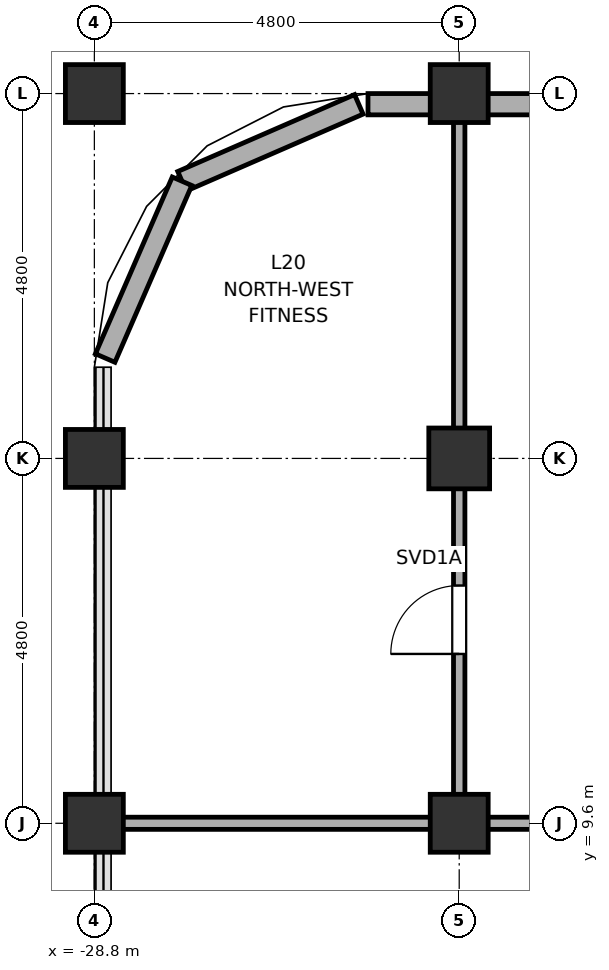
"""IFC4 building model, lengths in metres.
Left out: names, types, materials, properties, quantities, classifications, styles, units other than length and angle.
Written with IfcOpenShell. Run it as: python <this file> out.ifc"""

import sys

from ifc_helpers import new_model, si_unit, direction, frame, frame_2d, origin, origin_2d, place, context, subcontext, project, spatial, rectangle, hollow_rectangle, hollow_circle, extrude, element, fill, save


model = new_model("IFC4")
c1 = context("Model", 3, precision=1e-05, world=origin(), true_north=direction((0.0, 1.0)))
c2 = subcontext(c1, "Body", "Model", "MODEL_VIEW")
j1 = project(units=[si_unit("LENGTHUNIT", "METRE"), si_unit("PLANEANGLEUNIT", "RADIAN")], contexts=[c1])
p1 = place(None, origin())
s1 = spatial("IfcSite", under=j1, at=p1, CompositionType="ELEMENT")
p2 = place(p1, origin())
s2 = spatial("IfcBuilding", under=s1, at=p2, CompositionType="ELEMENT")
p3 = place(p2, frame((0.0, 0.0, 85.5)))
s3 = spatial("IfcBuildingStorey", under=s2, at=p3, CompositionType="ELEMENT", Elevation=85.5)
for number, where, z_axis, x_axis in (
    (1, (-28.8, 9.6, 0.0), (0.0, 0.0, 1.0), (1.0, 0.0, 0.0)),
    (2, (-28.8, 14.4, 0.0), (0.0, 0.0, 1.0), (1.0, 0.0, 0.0)),
    (3, (-28.8, 19.2, 0.0), (0.0, 0.0, 1.0), (1.0, 0.0, 0.0)),
    (4, (-24.0, 9.6, 0.0), (0.0, 0.0, 1.0), (1.0, 0.0, 0.0)),
):
    element("IfcColumn", number, at=place(p3, frame(where, z_axis=z_axis, x_axis=x_axis)), inside=s3, PredefinedType="COLUMN", context=c2, shape_type="SweptSolid", body=[
        extrude(hollow_circle(Radius=0.381, WallThickness=0.032, at=origin_2d()), origin(), (0.0, 0.0, 1.0), 3.7),
    ])
p4 = place(p3, frame((-24.0, 14.4, 0.0), z_axis=(0.0, 0.0, 1.0), x_axis=(1.0, 0.0, 0.0)))
e5 = element("IfcColumn", 5, at=p4, inside=s3, PredefinedType="COLUMN", context=c2, shape_type="SweptSolid", body=[
    extrude(hollow_rectangle(XDim=0.8, YDim=0.8, WallThickness=0.036, at=origin_2d()), origin(), (0.0, 0.0, 1.0), 3.7),
])
p5 = place(p3, frame((-24.0, 19.2, 0.0), z_axis=(0.0, 0.0, 1.0), x_axis=(1.0, 0.0, 0.0)))
e6 = element("IfcColumn", 6, at=p5, inside=s3, PredefinedType="COLUMN", context=c2, shape_type="SweptSolid", body=[
    extrude(hollow_circle(Radius=0.381, WallThickness=0.032, at=origin_2d()), origin(), (0.0, 0.0, 1.0), 3.7),
])
p6 = place(p3, frame((-25.321, 19.058, 0.0), z_axis=(0.0, 0.0, 1.0), x_axis=(-0.917060872934, -0.398747232384, 0.0)))
e7 = element("IfcWall", 7, at=p6, inside=s3, PredefinedType="SOLIDWALL", context=c2, shape_type="SweptSolid", body=[
    extrude(rectangle(XDim=2.536, YDim=0.28, at=frame_2d((1.268, 0.0))), origin(), (0.0, 0.0, 1.0), 2.05),
])
p7 = place(p3, frame((-27.646, 18.047, 0.0), z_axis=(0.0, 0.0, 1.0), x_axis=(-0.398792985289, -0.917040977756, 0.0)))
e8 = element("IfcWall", 8, at=p7, inside=s3, PredefinedType="SOLIDWALL", context=c2, shape_type="SweptSolid", body=[
    extrude(rectangle(XDim=2.536, YDim=0.28, at=frame_2d((1.268, 0.0))), origin(), (0.0, 0.0, 1.0), 2.75),
])
p8 = place(p3, frame((-25.2, 19.06, 0.0), z_axis=(0.0, 0.0, 1.0), x_axis=(1.0, 0.0, 0.0)))
e9 = element("IfcWall", 9, at=p8, inside=s3, PredefinedType="SOLIDWALL", context=c2, shape_type="SweptSolid", body=[
    extrude(rectangle(XDim=20.45, YDim=0.28, at=frame_2d((10.225, 0.0))), origin(), (0.0, 0.0, 1.0), 2.05),
])
p9 = place(p8, frame((9.0, 0.0, 0.75)))
e10 = element("IfcOpeningElement", 10, at=p9, cuts=e9, PredefinedType="OPENING", context=c2, shape_type="SweptSolid", body=[
    extrude(rectangle(XDim=1.2, YDim=1.15, at=frame_2d((0.6, 0.575))), frame((0.0, 0.155, 0.0), z_axis=(0.0, -1.0, 0.0), x_axis=(1.0, 0.0, 0.0)), (0.0, 0.0, 1.0), 0.31),
])
p10 = place(p8, frame((12.3, 0.0, 0.75)))
e11 = element("IfcOpeningElement", 11, at=p10, cuts=e9, PredefinedType="OPENING", context=c2, shape_type="SweptSolid", body=[
    extrude(rectangle(XDim=1.8, YDim=1.15, at=frame_2d((0.9, 0.575))), frame((0.0, 0.155, 0.0), z_axis=(0.0, -1.0, 0.0), x_axis=(1.0, 0.0, 0.0)), (0.0, 0.0, 1.0), 0.31),
])
p11 = place(p8, frame((17.1, 0.0, 0.75)))
e12 = element("IfcOpeningElement", 12, at=p11, cuts=e9, PredefinedType="OPENING", context=c2, shape_type="SweptSolid", body=[
    extrude(rectangle(XDim=1.8, YDim=1.15, at=frame_2d((0.9, 0.575))), frame((0.0, 0.155, 0.0), z_axis=(0.0, -1.0, 0.0), x_axis=(1.0, 0.0, 0.0)), (0.0, 0.0, 1.0), 0.31),
])
p12 = place(p3, frame((-28.63, 9.6, 0.0), z_axis=(0.0, 0.0, 1.0), x_axis=(1.0, 0.0, 0.0)))
e13 = element("IfcWall", 13, at=p12, inside=s3, PredefinedType="PARTITIONING", context=c2, shape_type="SweptSolid", body=[
    extrude(rectangle(XDim=62.06, YDim=0.16, at=frame_2d((31.03, 0.0))), origin(), (0.0, 0.0, 1.0), 2.05),
])
p13 = place(p12, frame((6.54, 0.0, 0.0)))
e14 = element("IfcOpeningElement", 14, at=p13, cuts=e13, PredefinedType="OPENING", context=c2, shape_type="SweptSolid", body=[
    extrude(rectangle(XDim=0.9, YDim=2.02, at=frame_2d((0.45, 1.01))), frame((0.0, 0.095, 0.0), z_axis=(0.0, -1.0, 0.0), x_axis=(1.0, 0.0, 0.0)), (0.0, 0.0, 1.0), 0.19),
])
p14 = place(p12, frame((54.62, 0.0, 0.0)))
e15 = element("IfcOpeningElement", 15, at=p14, cuts=e13, PredefinedType="OPENING", context=c2, shape_type="SweptSolid", body=[
    extrude(rectangle(XDim=0.9, YDim=2.02, at=frame_2d((0.45, 1.01))), frame((0.0, 0.095, 0.0), z_axis=(0.0, -1.0, 0.0), x_axis=(1.0, 0.0, 0.0)), (0.0, 0.0, 1.0), 0.19),
])
p15 = place(p12, frame((10.69, 0.0, 0.0)))
e16 = element("IfcOpeningElement", 16, at=p15, cuts=e13, PredefinedType="OPENING", context=c2, shape_type="SweptSolid", body=[
    extrude(rectangle(XDim=0.9, YDim=2.02, at=frame_2d((0.45, 1.01))), frame((0.0, 0.095, 0.0), z_axis=(0.0, -1.0, 0.0), x_axis=(1.0, 0.0, 0.0)), (0.0, 0.0, 1.0), 0.19),
])
p16 = place(p12, frame((12.58, 0.0, 0.0)))
e17 = element("IfcOpeningElement", 17, at=p16, cuts=e13, PredefinedType="OPENING", context=c2, shape_type="SweptSolid", body=[
    extrude(rectangle(XDim=0.9, YDim=2.02, at=frame_2d((0.45, 1.01))), frame((0.0, 0.095, 0.0), z_axis=(0.0, -1.0, 0.0), x_axis=(1.0, 0.0, 0.0)), (0.0, 0.0, 1.0), 0.19),
])
p17 = place(p12, frame((16.74, 0.0, 0.0)))
e18 = element("IfcOpeningElement", 18, at=p17, cuts=e13, PredefinedType="OPENING", context=c2, shape_type="SweptSolid", body=[
    extrude(rectangle(XDim=0.92, YDim=2.02, at=frame_2d((0.46, 1.01))), frame((0.0, 0.095, 0.0), z_axis=(0.0, -1.0, 0.0), x_axis=(1.0, 0.0, 0.0)), (0.0, 0.0, 1.0), 0.19),
])
p18 = place(p12, frame((20.4, 0.0, 0.0)))
e19 = element("IfcOpeningElement", 19, at=p18, cuts=e13, PredefinedType="OPENING", context=c2, shape_type="SweptSolid", body=[
    extrude(rectangle(XDim=0.92, YDim=2.02, at=frame_2d((0.46, 1.01))), frame((0.0, 0.095, 0.0), z_axis=(0.0, -1.0, 0.0), x_axis=(1.0, 0.0, 0.0)), (0.0, 0.0, 1.0), 0.19),
])
p19 = place(p12, frame((26.34, 0.0, 0.0)))
e20 = element("IfcOpeningElement", 20, at=p19, cuts=e13, PredefinedType="OPENING", context=c2, shape_type="SweptSolid", body=[
    extrude(rectangle(XDim=0.92, YDim=2.02, at=frame_2d((0.46, 1.01))), frame((0.0, 0.095, 0.0), z_axis=(0.0, -1.0, 0.0), x_axis=(1.0, 0.0, 0.0)), (0.0, 0.0, 1.0), 0.19),
])
p20 = place(p12, frame((30.0, 0.0, 0.0)))
e21 = element("IfcOpeningElement", 21, at=p20, cuts=e13, PredefinedType="OPENING", context=c2, shape_type="SweptSolid", body=[
    extrude(rectangle(XDim=0.92, YDim=2.02, at=frame_2d((0.46, 1.01))), frame((0.0, 0.095, 0.0), z_axis=(0.0, -1.0, 0.0), x_axis=(1.0, 0.0, 0.0)), (0.0, 0.0, 1.0), 0.19),
])
p21 = place(p12, frame((35.38, 0.0, 0.0)))
e22 = element("IfcOpeningElement", 22, at=p21, cuts=e13, PredefinedType="OPENING", context=c2, shape_type="SweptSolid", body=[
    extrude(rectangle(XDim=0.9, YDim=2.02, at=frame_2d((0.45, 1.01))), frame((0.0, 0.095, 0.0), z_axis=(0.0, -1.0, 0.0), x_axis=(1.0, 0.0, 0.0)), (0.0, 0.0, 1.0), 0.19),
])
p22 = place(p12, frame((40.18, 0.0, 0.0)))
e23 = element("IfcOpeningElement", 23, at=p22, cuts=e13, PredefinedType="OPENING", context=c2, shape_type="SweptSolid", body=[
    extrude(rectangle(XDim=0.9, YDim=2.02, at=frame_2d((0.45, 1.01))), frame((0.0, 0.095, 0.0), z_axis=(0.0, -1.0, 0.0), x_axis=(1.0, 0.0, 0.0)), (0.0, 0.0, 1.0), 0.19),
])
p23 = place(p12, frame((44.98, 0.0, 0.0)))
e24 = element("IfcOpeningElement", 24, at=p23, cuts=e13, PredefinedType="OPENING", context=c2, shape_type="SweptSolid", body=[
    extrude(rectangle(XDim=0.9, YDim=2.02, at=frame_2d((0.45, 1.01))), frame((0.0, 0.095, 0.0), z_axis=(0.0, -1.0, 0.0), x_axis=(1.0, 0.0, 0.0)), (0.0, 0.0, 1.0), 0.19),
])
p24 = place(p12, frame((50.34, 0.0, 0.0)))
e25 = element("IfcOpeningElement", 25, at=p24, cuts=e13, PredefinedType="OPENING", context=c2, shape_type="SweptSolid", body=[
    extrude(rectangle(XDim=0.92, YDim=2.02, at=frame_2d((0.46, 1.01))), frame((0.0, 0.095, 0.0), z_axis=(0.0, -1.0, 0.0), x_axis=(1.0, 0.0, 0.0)), (0.0, 0.0, 1.0), 0.19),
])
p25 = place(p3, frame((-24.0, 9.72, 0.0), z_axis=(0.0, 0.0, 1.0), x_axis=(0.0, 1.0, 0.0)))
e26 = element("IfcWall", 26, at=p25, inside=s3, PredefinedType="PARTITIONING", context=c2, shape_type="SweptSolid", body=[
    extrude(rectangle(XDim=9.19, YDim=0.15, at=frame_2d((4.595, 0.0))), origin(), (0.0, 0.0, 1.0), 2.05),
])
p26 = place(p25, frame((2.108, 0.0, 0.0)))
e27 = element("IfcOpeningElement", 27, at=p26, cuts=e26, PredefinedType="OPENING", context=c2, shape_type="SweptSolid", body=[
    extrude(rectangle(XDim=0.9, YDim=2.02, at=frame_2d((0.45, 1.01))), frame((0.0, 0.09, 0.0), z_axis=(0.0, -1.0, 0.0), x_axis=(1.0, 0.0, 0.0)), (0.0, 0.0, 1.0), 0.18),
])
p27 = place(p26, origin())
e28 = element("IfcDoor", 28, at=p27, inside=s3, OperationType="SINGLE_SWING_RIGHT", PredefinedType="DOOR", context=c2, shape_type="SweptSolid", body=[
    extrude(rectangle(XDim=0.9, YDim=2.02, at=frame_2d((0.45, 1.01))), frame((0.0, 0.025, 0.0), z_axis=(0.0, -1.0, 0.0), x_axis=(1.0, 0.0, 0.0)), (0.0, 0.0, 1.0), 0.05),
])
fill(e27, e28)
save(model, sys.argv[1])
